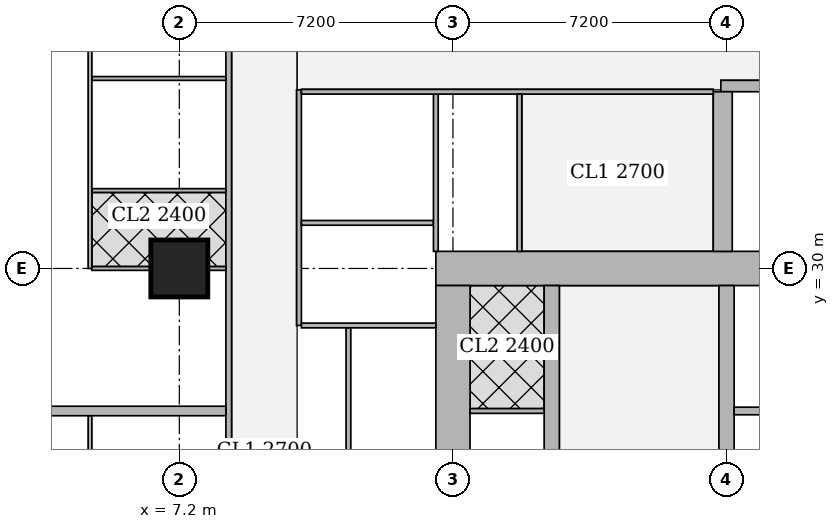
"""IFC4 building model, lengths in metres.
Left out: names, types, materials, properties, quantities, classifications, styles, units other than length and angle.
Written with IfcOpenShell. Run it as: python <this file> out.ifc"""

import sys

from ifc_helpers import new_model, si_unit, direction, frame, frame_2d, origin, origin_2d, place, context, subcontext, project, spatial, rectangle, extrude, element, fill, save


model = new_model("IFC4")
c1 = context("Model", 3, precision=1e-05, world=origin(), true_north=direction((0.0, 1.0)))
c2 = subcontext(c1, "Body", "Model", "MODEL_VIEW")
j1 = project(units=[si_unit("LENGTHUNIT", "METRE"), si_unit("PLANEANGLEUNIT", "RADIAN")], contexts=[c1])
p1 = place(None, origin())
s1 = spatial("IfcSite", under=j1, at=p1, CompositionType="ELEMENT")
p2 = place(p1, origin())
s2 = spatial("IfcBuilding", under=s1, at=p2, CompositionType="ELEMENT")
p3 = place(p2, frame((0.0, 0.0, 158.3)))
s3 = spatial("IfcBuildingStorey", under=s2, at=p3, CompositionType="ELEMENT", Elevation=158.3)
p4 = place(p3, frame((7.2, 30.0, 0.0), z_axis=(0.0, 0.0, 1.0), x_axis=(1.0, 0.0, 0.0)))
e1 = element("IfcColumn", 1, at=p4, inside=s3, PredefinedType="COLUMN", context=c2, shape_type="SweptSolid", body=[
    extrude(rectangle(XDim=1.5, YDim=1.5, at=origin_2d()), origin(), (0.0, 0.0, 1.0), 3.75),
])
p5 = place(p3, frame((13.95, 30.0, 0.0), z_axis=(0.0, 0.0, 1.0), x_axis=(1.0, 0.0, 0.0)))
e2 = element("IfcWall", 2, at=p5, inside=s3, PredefinedType="SHEAR", context=c2, shape_type="SweptSolid", body=[
    extrude(rectangle(XDim=15.3, YDim=0.9, at=frame_2d((7.65, 0.0))), origin(), (0.0, 0.0, 1.0), 3.75),
])
p6 = place(p5, frame((4.45, 0.0, 0.0)))
e3 = element("IfcOpeningElement", 3, at=p6, cuts=e2, PredefinedType="OPENING", context=c2, shape_type="SweptSolid", body=[
    extrude(rectangle(XDim=1.8, YDim=2.1, at=frame_2d((0.9, 1.05))), frame((0.0, 0.46, 0.0), z_axis=(0.0, -1.0, 0.0), x_axis=(1.0, 0.0, 0.0)), (0.0, 0.0, 1.0), 0.92),
])
p7 = place(p5, frame((10.7, 0.0, 0.0)))
e4 = element("IfcOpeningElement", 4, at=p7, cuts=e2, PredefinedType="OPENING", context=c2, shape_type="SweptSolid", body=[
    extrude(rectangle(XDim=1.1, YDim=2.1, at=frame_2d((0.55, 1.05))), frame((0.0, 0.46, 0.0), z_axis=(0.0, -1.0, 0.0), x_axis=(1.0, 0.0, 0.0)), (0.0, 0.0, 1.0), 0.92),
])
p8 = place(p3, frame((14.4, 15.45, 0.0), z_axis=(0.0, 0.0, 1.0), x_axis=(0.0, 1.0, 0.0)))
e5 = element("IfcWall", 5, at=p8, inside=s3, PredefinedType="SHEAR", context=c2, shape_type="SweptSolid", body=[
    extrude(rectangle(XDim=14.1, YDim=0.9, at=frame_2d((7.05, 0.0))), origin(), (0.0, 0.0, 1.0), 3.75),
])
p9 = place(p3, frame((17.0, 15.45, 0.0), z_axis=(0.0, 0.0, 1.0), x_axis=(0.0, 1.0, 0.0)))
e6 = element("IfcWall", 6, at=p9, inside=s3, PredefinedType="SHEAR", context=c2, shape_type="SweptSolid", body=[
    extrude(rectangle(XDim=14.1, YDim=0.4, at=frame_2d((7.05, 0.0))), origin(), (0.0, 0.0, 1.0), 3.75),
])
p10 = place(p9, frame((0.925, 0.0, 0.0)))
e7 = element("IfcOpeningElement", 7, at=p10, cuts=e6, PredefinedType="OPENING", context=c2, shape_type="SweptSolid", body=[
    extrude(rectangle(XDim=1.0, YDim=2.1, at=frame_2d((0.5, 1.05))), frame((0.0, 0.21, 0.0), z_axis=(0.0, -1.0, 0.0), x_axis=(1.0, 0.0, 0.0)), (0.0, 0.0, 1.0), 0.42),
])
p11 = place(p9, frame((4.675, 0.0, 0.0)))
e8 = element("IfcOpeningElement", 8, at=p11, cuts=e6, PredefinedType="OPENING", context=c2, shape_type="SweptSolid", body=[
    extrude(rectangle(XDim=1.0, YDim=2.1, at=frame_2d((0.5, 1.05))), frame((0.0, 0.21, 0.0), z_axis=(0.0, -1.0, 0.0), x_axis=(1.0, 0.0, 0.0)), (0.0, 0.0, 1.0), 0.42),
])
p12 = place(p9, frame((8.425, 0.0, 0.0)))
e9 = element("IfcOpeningElement", 9, at=p12, cuts=e6, PredefinedType="OPENING", context=c2, shape_type="SweptSolid", body=[
    extrude(rectangle(XDim=1.0, YDim=2.1, at=frame_2d((0.5, 1.05))), frame((0.0, 0.21, 0.0), z_axis=(0.0, -1.0, 0.0), x_axis=(1.0, 0.0, 0.0)), (0.0, 0.0, 1.0), 0.42),
])
p13 = place(p9, frame((12.175, 0.0, 0.0)))
e10 = element("IfcOpeningElement", 10, at=p13, cuts=e6, PredefinedType="OPENING", context=c2, shape_type="SweptSolid", body=[
    extrude(rectangle(XDim=1.0, YDim=2.1, at=frame_2d((0.5, 1.05))), frame((0.0, 0.21, 0.0), z_axis=(0.0, -1.0, 0.0), x_axis=(1.0, 0.0, 0.0)), (0.0, 0.0, 1.0), 0.42),
])
p14 = place(p3, frame((21.6, 15.45, 0.0), z_axis=(0.0, 0.0, 1.0), x_axis=(0.0, 1.0, 0.0)))
e11 = element("IfcWall", 11, at=p14, inside=s3, PredefinedType="SHEAR", context=c2, shape_type="SweptSolid", body=[
    extrude(rectangle(XDim=14.1, YDim=0.4, at=frame_2d((7.05, 0.0))), origin(), (0.0, 0.0, 1.0), 3.75),
])
p15 = place(p14, frame((0.875, 0.0, 0.0)))
e12 = element("IfcOpeningElement", 12, at=p15, cuts=e11, PredefinedType="OPENING", context=c2, shape_type="SweptSolid", body=[
    extrude(rectangle(XDim=1.1, YDim=2.1, at=frame_2d((0.55, 1.05))), frame((0.0, 0.21, 0.0), z_axis=(0.0, -1.0, 0.0), x_axis=(1.0, 0.0, 0.0)), (0.0, 0.0, 1.0), 0.42),
])
p16 = place(p14, frame((4.625, 0.0, 0.0)))
e13 = element("IfcOpeningElement", 13, at=p16, cuts=e11, PredefinedType="OPENING", context=c2, shape_type="SweptSolid", body=[
    extrude(rectangle(XDim=1.1, YDim=2.1, at=frame_2d((0.55, 1.05))), frame((0.0, 0.21, 0.0), z_axis=(0.0, -1.0, 0.0), x_axis=(1.0, 0.0, 0.0)), (0.0, 0.0, 1.0), 0.42),
])
p17 = place(p14, frame((8.375, 0.0, 0.0)))
e14 = element("IfcOpeningElement", 14, at=p17, cuts=e11, PredefinedType="OPENING", context=c2, shape_type="SweptSolid", body=[
    extrude(rectangle(XDim=1.1, YDim=2.1, at=frame_2d((0.55, 1.05))), frame((0.0, 0.21, 0.0), z_axis=(0.0, -1.0, 0.0), x_axis=(1.0, 0.0, 0.0)), (0.0, 0.0, 1.0), 0.42),
])
p18 = place(p14, frame((12.125, 0.0, 0.0)))
e15 = element("IfcOpeningElement", 15, at=p18, cuts=e11, PredefinedType="OPENING", context=c2, shape_type="SweptSolid", body=[
    extrude(rectangle(XDim=1.1, YDim=2.1, at=frame_2d((0.55, 1.05))), frame((0.0, 0.21, 0.0), z_axis=(0.0, -1.0, 0.0), x_axis=(1.0, 0.0, 0.0)), (0.0, 0.0, 1.0), 0.42),
])
p19 = place(p3, frame((21.45, 34.8, 0.0), z_axis=(0.0, 0.0, 1.0), x_axis=(1.0, 0.0, 0.0)))
e16 = element("IfcWall", 16, at=p19, inside=s3, PredefinedType="SHEAR", context=c2, shape_type="SweptSolid", body=[
    extrude(rectangle(XDim=7.5, YDim=0.3, at=frame_2d((3.75, 0.0))), origin(), (0.0, 0.0, 1.0), 3.75),
])
p20 = place(p19, frame((0.5, 0.0, 0.0)))
e17 = element("IfcOpeningElement", 17, at=p20, cuts=e16, PredefinedType="OPENING", context=c2, shape_type="SweptSolid", body=[
    extrude(rectangle(XDim=1.1, YDim=2.1, at=frame_2d((0.55, 1.05))), frame((0.0, 0.16, 0.0), z_axis=(0.0, -1.0, 0.0), x_axis=(1.0, 0.0, 0.0)), (0.0, 0.0, 1.0), 0.32),
])
p21 = place(p3, frame((21.5, 30.45, 0.0), z_axis=(0.0, 0.0, 1.0), x_axis=(0.0, 1.0, 0.0)))
e18 = element("IfcWall", 18, at=p21, inside=s3, PredefinedType="SHEAR", context=c2, shape_type="SweptSolid", body=[
    extrude(rectangle(XDim=4.2, YDim=0.5, at=frame_2d((2.1, 0.0))), origin(), (0.0, 0.0, 1.0), 3.75),
])
p22 = place(p3, frame((8.5, 1.964, 0.0), z_axis=(0.0, 0.0, 1.0), x_axis=(0.0, 1.0, 0.0)))
e19 = element("IfcWall", 19, at=p22, inside=s3, PredefinedType="SOLIDWALL", context=c2, shape_type="SweptSolid", body=[
    extrude(rectangle(XDim=41.097, YDim=0.15, at=frame_2d((20.548, 0.0))), origin(), (0.0, 0.0, 1.0), 3.5),
])
p23 = place(p22, frame((6.911, 0.0, 0.0)))
e20 = element("IfcOpeningElement", 20, at=p23, cuts=e19, PredefinedType="OPENING", context=c2, shape_type="SweptSolid", body=[
    extrude(rectangle(XDim=1.0, YDim=2.1, at=frame_2d((0.5, 1.05))), frame((0.0, 0.085, 0.0), z_axis=(0.0, -1.0, 0.0), x_axis=(1.0, 0.0, 0.0)), (0.0, 0.0, 1.0), 0.17),
])
p24 = place(p22, frame((10.661, 0.0, 0.0)))
e21 = element("IfcOpeningElement", 21, at=p24, cuts=e19, PredefinedType="OPENING", context=c2, shape_type="SweptSolid", body=[
    extrude(rectangle(XDim=1.0, YDim=2.1, at=frame_2d((0.5, 1.05))), frame((0.0, 0.085, 0.0), z_axis=(0.0, -1.0, 0.0), x_axis=(1.0, 0.0, 0.0)), (0.0, 0.0, 1.0), 0.17),
])
p25 = place(p22, frame((25.661, 0.0, 0.0)))
e22 = element("IfcOpeningElement", 22, at=p25, cuts=e19, PredefinedType="OPENING", context=c2, shape_type="SweptSolid", body=[
    extrude(rectangle(XDim=1.0, YDim=2.1, at=frame_2d((0.5, 1.05))), frame((0.0, 0.085, 0.0), z_axis=(0.0, -1.0, 0.0), x_axis=(1.0, 0.0, 0.0)), (0.0, 0.0, 1.0), 0.17),
])
p26 = place(p3, frame((4.85, 15.0, 0.0), z_axis=(0.0, 0.0, 1.0), x_axis=(0.0, 1.0, 0.0)))
e23 = element("IfcWall", 23, at=p26, inside=s3, PredefinedType="PARTITIONING", context=c2, shape_type="SweptSolid", body=[
    extrude(rectangle(XDim=11.125, YDim=0.1, at=frame_2d((5.562, 0.0))), origin(), (0.0, 0.0, 1.0), 3.5),
])
p27 = place(p26, frame((0.4, 0.0, 0.0)))
e24 = element("IfcOpeningElement", 24, at=p27, cuts=e23, PredefinedType="OPENING", context=c2, shape_type="SweptSolid", body=[
    extrude(rectangle(XDim=0.9, YDim=2.1, at=frame_2d((0.45, 1.05))), frame((0.0, 0.06, 0.0), z_axis=(0.0, -1.0, 0.0), x_axis=(1.0, 0.0, 0.0)), (0.0, 0.0, 1.0), 0.12),
])
p28 = place(p26, frame((5.799, 0.0, 0.0)))
e25 = element("IfcOpeningElement", 25, at=p28, cuts=e23, PredefinedType="OPENING", context=c2, shape_type="SweptSolid", body=[
    extrude(rectangle(XDim=0.9, YDim=2.1, at=frame_2d((0.45, 1.05))), frame((0.0, 0.06, 0.0), z_axis=(0.0, -1.0, 0.0), x_axis=(1.0, 0.0, 0.0)), (0.0, 0.0, 1.0), 0.12),
])
p29 = place(p26, frame((8.075, 0.0, 0.0)))
e26 = element("IfcOpeningElement", 26, at=p29, cuts=e23, PredefinedType="OPENING", context=c2, shape_type="SweptSolid", body=[
    extrude(rectangle(XDim=0.9, YDim=2.1, at=frame_2d((0.45, 1.05))), frame((0.0, 0.06, 0.0), z_axis=(0.0, -1.0, 0.0), x_axis=(1.0, 0.0, 0.0)), (0.0, 0.0, 1.0), 0.12),
])
p30 = place(p26, frame((2.899, 0.0, 0.0)))
e27 = element("IfcOpeningElement", 27, at=p30, cuts=e23, PredefinedType="OPENING", context=c2, shape_type="SweptSolid", body=[
    extrude(rectangle(XDim=0.9, YDim=2.1, at=frame_2d((0.45, 1.05))), frame((0.0, 0.06, 0.0), z_axis=(0.0, -1.0, 0.0), x_axis=(1.0, 0.0, 0.0)), (0.0, 0.0, 1.0), 0.12),
])
p31 = place(p26, frame((9.95, 0.0, 0.0)))
e28 = element("IfcOpeningElement", 28, at=p31, cuts=e23, PredefinedType="OPENING", context=c2, shape_type="SweptSolid", body=[
    extrude(rectangle(XDim=0.9, YDim=2.1, at=frame_2d((0.45, 1.05))), frame((0.0, 0.06, 0.0), z_axis=(0.0, -1.0, 0.0), x_axis=(1.0, 0.0, 0.0)), (0.0, 0.0, 1.0), 0.12),
])
p32 = place(p3, frame((4.85, 30.0, 0.0), z_axis=(0.0, 0.0, 1.0), x_axis=(0.0, 1.0, 0.0)))
e29 = element("IfcWall", 29, at=p32, inside=s3, PredefinedType="PARTITIONING", context=c2, shape_type="SweptSolid", body=[
    extrude(rectangle(XDim=12.507, YDim=0.1, at=frame_2d((6.253, 0.0))), origin(), (0.0, 0.0, 1.0), 3.5),
])
p33 = place(p32, frame((0.575, 0.0, 0.0)))
e30 = element("IfcOpeningElement", 30, at=p33, cuts=e29, PredefinedType="OPENING", context=c2, shape_type="SweptSolid", body=[
    extrude(rectangle(XDim=0.9, YDim=2.1, at=frame_2d((0.45, 1.05))), frame((0.0, 0.06, 0.0), z_axis=(0.0, -1.0, 0.0), x_axis=(1.0, 0.0, 0.0)), (0.0, 0.0, 1.0), 0.12),
])
p34 = place(p32, frame((5.799, 0.0, 0.0)))
e31 = element("IfcOpeningElement", 31, at=p34, cuts=e29, PredefinedType="OPENING", context=c2, shape_type="SweptSolid", body=[
    extrude(rectangle(XDim=0.9, YDim=2.1, at=frame_2d((0.45, 1.05))), frame((0.0, 0.06, 0.0), z_axis=(0.0, -1.0, 0.0), x_axis=(1.0, 0.0, 0.0)), (0.0, 0.0, 1.0), 0.12),
])
p35 = place(p32, frame((7.9, 0.0, 0.0)))
e32 = element("IfcOpeningElement", 32, at=p35, cuts=e29, PredefinedType="OPENING", context=c2, shape_type="SweptSolid", body=[
    extrude(rectangle(XDim=0.9, YDim=2.1, at=frame_2d((0.45, 1.05))), frame((0.0, 0.06, 0.0), z_axis=(0.0, -1.0, 0.0), x_axis=(1.0, 0.0, 0.0)), (0.0, 0.0, 1.0), 0.12),
])
p36 = place(p32, frame((3.075, 0.0, 0.0)))
e33 = element("IfcOpeningElement", 33, at=p36, cuts=e29, PredefinedType="OPENING", context=c2, shape_type="SweptSolid", body=[
    extrude(rectangle(XDim=0.9, YDim=2.1, at=frame_2d((0.45, 1.05))), frame((0.0, 0.06, 0.0), z_axis=(0.0, -1.0, 0.0), x_axis=(1.0, 0.0, 0.0)), (0.0, 0.0, 1.0), 0.12),
])
p37 = place(p32, frame((10.4, 0.0, 0.0)))
e34 = element("IfcOpeningElement", 34, at=p37, cuts=e29, PredefinedType="OPENING", context=c2, shape_type="SweptSolid", body=[
    extrude(rectangle(XDim=0.9, YDim=2.1, at=frame_2d((0.45, 1.05))), frame((0.0, 0.06, 0.0), z_axis=(0.0, -1.0, 0.0), x_axis=(1.0, 0.0, 0.0)), (0.0, 0.0, 1.0), 0.12),
])
p38 = place(p3, frame((4.9, 30.0, 0.0), z_axis=(0.0, 0.0, 1.0), x_axis=(1.0, 0.0, 0.0)))
e35 = element("IfcWall", 35, at=p38, inside=s3, PredefinedType="PARTITIONING", context=c2, shape_type="SweptSolid", body=[
    extrude(rectangle(XDim=1.549, YDim=0.1, at=frame_2d((0.774, 0.0))), origin(), (0.0, 0.0, 1.0), 3.5),
])
p39 = place(p3, frame((7.951, 30.0, 0.0), z_axis=(0.0, 0.0, 1.0), x_axis=(1.0, 0.0, 0.0)))
e36 = element("IfcWall", 36, at=p39, inside=s3, PredefinedType="PARTITIONING", context=c2, shape_type="SweptSolid", body=[
    extrude(rectangle(XDim=0.474, YDim=0.1, at=frame_2d((0.237, 0.0))), origin(), (0.0, 0.0, 1.0), 3.5),
])
for number, where, z_axis, x_axis in (
    (37, (4.9, 34.999, 0.0), (0.0, 0.0, 1.0), (1.0, 0.0, 0.0)),
    (38, (4.9, 32.05, 0.0), (0.0, 0.0, 1.0), (1.0, 0.0, 0.0)),
):
    element("IfcWall", number, at=place(p3, frame(where, z_axis=z_axis, x_axis=x_axis)), inside=s3, PredefinedType="PARTITIONING", context=c2, shape_type="SweptSolid", body=[
        extrude(rectangle(XDim=3.525, YDim=0.1, at=frame_2d((1.763, 0.0))), origin(), (0.0, 0.0, 1.0), 3.5),
    ])
p40 = place(p3, frame((3.65, 26.25, 0.0), z_axis=(0.0, 0.0, 1.0), x_axis=(1.0, 0.0, 0.0)))
e39 = element("IfcWall", 39, at=p40, inside=s3, PredefinedType="SOLIDWALL", context=c2, shape_type="SweptSolid", body=[
    extrude(rectangle(XDim=4.775, YDim=0.25, at=frame_2d((2.388, 0.0))), origin(), (0.0, 0.0, 1.0), 3.5),
])
p41 = place(p3, frame((10.35, 28.5, 0.0), z_axis=(0.0, 0.0, 1.0), x_axis=(0.0, 1.0, 0.0)))
e40 = element("IfcWall", 40, at=p41, inside=s3, PredefinedType="PARTITIONING", context=c2, shape_type="SweptSolid", body=[
    extrude(rectangle(XDim=6.2, YDim=0.125, at=frame_2d((3.1, 0.0))), origin(), (0.0, 0.0, 1.0), 3.5),
])
p42 = place(p41, frame((0.85, 0.0, 0.0)))
e41 = element("IfcOpeningElement", 41, at=p42, cuts=e40, PredefinedType="OPENING", context=c2, shape_type="SweptSolid", body=[
    extrude(rectangle(XDim=1.0, YDim=2.1, at=frame_2d((0.5, 1.05))), frame((0.0, 0.073, 0.0), z_axis=(0.0, -1.0, 0.0), x_axis=(1.0, 0.0, 0.0)), (0.0, 0.0, 1.0), 0.145),
])
p43 = place(p41, frame((3.95, 0.0, 0.0)))
e42 = element("IfcOpeningElement", 42, at=p43, cuts=e40, PredefinedType="OPENING", context=c2, shape_type="SweptSolid", body=[
    extrude(rectangle(XDim=1.0, YDim=2.1, at=frame_2d((0.5, 1.05))), frame((0.0, 0.073, 0.0), z_axis=(0.0, -1.0, 0.0), x_axis=(1.0, 0.0, 0.0)), (0.0, 0.0, 1.0), 0.145),
])
p44 = place(p3, frame((11.65, 19.562, 0.0), z_axis=(0.0, 0.0, 1.0), x_axis=(0.0, 1.0, 0.0)))
e43 = element("IfcWall", 43, at=p44, inside=s3, PredefinedType="PARTITIONING", context=c2, shape_type="SweptSolid", body=[
    extrude(rectangle(XDim=8.876, YDim=0.125, at=frame_2d((4.438, 0.0))), origin(), (0.0, 0.0, 1.0), 3.5),
])
p45 = place(p44, frame((3.938, 0.0, 0.0)))
e44 = element("IfcOpeningElement", 44, at=p45, cuts=e43, PredefinedType="OPENING", context=c2, shape_type="SweptSolid", body=[
    extrude(rectangle(XDim=1.0, YDim=2.1, at=frame_2d((0.5, 1.05))), frame((0.0, 0.073, 0.0), z_axis=(0.0, -1.0, 0.0), x_axis=(1.0, 0.0, 0.0)), (0.0, 0.0, 1.0), 0.145),
])
p46 = place(p3, frame((10.413, 28.5, 0.0), z_axis=(0.0, 0.0, 1.0), x_axis=(1.0, 0.0, 0.0)))
e45 = element("IfcWall", 45, at=p46, inside=s3, PredefinedType="PARTITIONING", context=c2, shape_type="SweptSolid", body=[
    extrude(rectangle(XDim=3.537, YDim=0.125, at=frame_2d((1.769, 0.0))), origin(), (0.0, 0.0, 1.0), 3.5),
])
p47 = place(p3, frame((10.413, 31.2, 0.0), z_axis=(0.0, 0.0, 1.0), x_axis=(1.0, 0.0, 0.0)))
e46 = element("IfcWall", 46, at=p47, inside=s3, PredefinedType="PARTITIONING", context=c2, shape_type="SweptSolid", body=[
    extrude(rectangle(XDim=3.475, YDim=0.125, at=frame_2d((1.737, 0.0))), origin(), (0.0, 0.0, 1.0), 3.5),
])
p48 = place(p3, frame((13.95, 30.45, 0.0), z_axis=(0.0, 0.0, 1.0), x_axis=(0.0, 1.0, 0.0)))
e47 = element("IfcWall", 47, at=p48, inside=s3, PredefinedType="PARTITIONING", context=c2, shape_type="SweptSolid", body=[
    extrude(rectangle(XDim=4.137, YDim=0.125, at=frame_2d((2.068, 0.0))), origin(), (0.0, 0.0, 1.0), 3.5),
])
p49 = place(p3, frame((10.413, 34.65, 0.0), z_axis=(0.0, 0.0, 1.0), x_axis=(1.0, 0.0, 0.0)))
e48 = element("IfcWall", 48, at=p49, inside=s3, PredefinedType="PARTITIONING", context=c2, shape_type="SweptSolid", body=[
    extrude(rectangle(XDim=10.837, YDim=0.125, at=frame_2d((5.418, 0.0))), origin(), (0.0, 0.0, 1.0), 3.5),
])
p50 = place(p49, frame((7.487, 0.0, 0.0)))
e49 = element("IfcOpeningElement", 49, at=p50, cuts=e48, PredefinedType="OPENING", context=c2, shape_type="SweptSolid", body=[
    extrude(rectangle(XDim=1.8, YDim=2.1, at=frame_2d((0.9, 1.05))), frame((0.0, 0.073, 0.0), z_axis=(0.0, -1.0, 0.0), x_axis=(1.0, 0.0, 0.0)), (0.0, 0.0, 1.0), 0.145),
])
p51 = place(p3, frame((16.15, 30.45, 0.0), z_axis=(0.0, 0.0, 1.0), x_axis=(0.0, 1.0, 0.0)))
e50 = element("IfcWall", 50, at=p51, inside=s3, PredefinedType="PARTITIONING", context=c2, shape_type="SweptSolid", body=[
    extrude(rectangle(XDim=4.137, YDim=0.125, at=frame_2d((2.068, 0.0))), origin(), (0.0, 0.0, 1.0), 3.5),
])
p52 = place(p51, frame((1.625, 0.0, 0.0)))
e51 = element("IfcOpeningElement", 51, at=p52, cuts=e50, PredefinedType="OPENING", context=c2, shape_type="SweptSolid", body=[
    extrude(rectangle(XDim=1.0, YDim=2.1, at=frame_2d((0.5, 1.05))), frame((0.0, 0.073, 0.0), z_axis=(0.0, -1.0, 0.0), x_axis=(1.0, 0.0, 0.0)), (0.0, 0.0, 1.0), 0.145),
])
p53 = place(p3, frame((14.85, 26.25, 0.0), z_axis=(0.0, 0.0, 1.0), x_axis=(1.0, 0.0, 0.0)))
e52 = element("IfcWall", 52, at=p53, inside=s3, PredefinedType="PARTITIONING", context=c2, shape_type="SweptSolid", body=[
    extrude(rectangle(XDim=1.95, YDim=0.125, at=frame_2d((0.975, 0.0))), origin(), (0.0, 0.0, 1.0), 3.5),
])
p54 = place(p3, frame((21.8, 26.25, 0.0), z_axis=(0.0, 0.0, 1.0), x_axis=(1.0, 0.0, 0.0)))
e53 = element("IfcWall", 53, at=p54, inside=s3, PredefinedType="SOLIDWALL", context=c2, shape_type="SweptSolid", body=[
    extrude(rectangle(XDim=2.2, YDim=0.2, at=frame_2d((1.1, 0.0))), origin(), (0.0, 0.0, 1.0), 3.5),
])
p55 = place(p31, origin())
e54 = element("IfcDoor", 54, at=p55, inside=s3, OperationType="SINGLE_SWING_LEFT", PredefinedType="DOOR", context=c2, shape_type="SweptSolid", body=[
    extrude(rectangle(XDim=0.9, YDim=2.1, at=frame_2d((0.45, 1.05))), frame((0.0, 0.025, 0.0), z_axis=(0.0, -1.0, 0.0), x_axis=(1.0, 0.0, 0.0)), (0.0, 0.0, 1.0), 0.05),
])
fill(e28, e54)
p56 = place(p33, origin())
e55 = element("IfcDoor", 55, at=p56, inside=s3, OperationType="SINGLE_SWING_RIGHT", PredefinedType="DOOR", context=c2, shape_type="SweptSolid", body=[
    extrude(rectangle(XDim=0.9, YDim=2.1, at=frame_2d((0.45, 1.05))), frame((0.0, 0.025, 0.0), z_axis=(0.0, -1.0, 0.0), x_axis=(1.0, 0.0, 0.0)), (0.0, 0.0, 1.0), 0.05),
])
fill(e30, e55)
p57 = place(p36, origin())
e56 = element("IfcDoor", 56, at=p57, inside=s3, OperationType="SINGLE_SWING_LEFT", PredefinedType="DOOR", context=c2, shape_type="SweptSolid", body=[
    extrude(rectangle(XDim=0.9, YDim=2.1, at=frame_2d((0.45, 1.05))), frame((0.0, 0.025, 0.0), z_axis=(0.0, -1.0, 0.0), x_axis=(1.0, 0.0, 0.0)), (0.0, 0.0, 1.0), 0.05),
])
fill(e33, e56)
p58 = place(p25, origin())
e57 = element("IfcDoor", 57, at=p58, inside=s3, OperationType="SINGLE_SWING_RIGHT", PredefinedType="DOOR", context=c2, shape_type="SweptSolid", body=[
    extrude(rectangle(XDim=1.0, YDim=2.1, at=frame_2d((0.5, 1.05))), frame((0.0, 0.025, 0.0), z_axis=(0.0, -1.0, 0.0), x_axis=(1.0, 0.0, 0.0)), (0.0, 0.0, 1.0), 0.05),
])
fill(e22, e57)
p59 = place(p42, origin())
e58 = element("IfcDoor", 58, at=p59, inside=s3, OperationType="SINGLE_SWING_RIGHT", PredefinedType="DOOR", context=c2, shape_type="SweptSolid", body=[
    extrude(rectangle(XDim=1.0, YDim=2.1, at=frame_2d((0.5, 1.05))), frame((0.0, 0.025, 0.0), z_axis=(0.0, -1.0, 0.0), x_axis=(1.0, 0.0, 0.0)), (0.0, 0.0, 1.0), 0.05),
])
fill(e41, e58)
p60 = place(p43, origin())
e59 = element("IfcDoor", 59, at=p60, inside=s3, OperationType="SINGLE_SWING_LEFT", PredefinedType="DOOR", context=c2, shape_type="SweptSolid", body=[
    extrude(rectangle(XDim=1.0, YDim=2.1, at=frame_2d((0.5, 1.05))), frame((0.0, 0.025, 0.0), z_axis=(0.0, -1.0, 0.0), x_axis=(1.0, 0.0, 0.0)), (0.0, 0.0, 1.0), 0.05),
])
fill(e42, e59)
p61 = place(p52, origin())
e60 = element("IfcDoor", 60, at=p61, inside=s3, OperationType="SINGLE_SWING_RIGHT", PredefinedType="DOOR", context=c2, shape_type="SweptSolid", body=[
    extrude(rectangle(XDim=1.0, YDim=2.1, at=frame_2d((0.5, 1.05))), frame((0.0, 0.025, 0.0), z_axis=(0.0, -1.0, 0.0), x_axis=(1.0, 0.0, 0.0)), (0.0, 0.0, 1.0), 0.05),
])
fill(e51, e60)
p62 = place(p50, origin())
e61 = element("IfcDoor", 61, at=p62, inside=s3, OperationType="DOUBLE_DOOR_SINGLE_SWING", PredefinedType="DOOR", context=c2, shape_type="SweptSolid", body=[
    extrude(rectangle(XDim=1.8, YDim=2.1, at=frame_2d((0.9, 1.05))), frame((0.0, 0.025, 0.0), z_axis=(0.0, -1.0, 0.0), x_axis=(1.0, 0.0, 0.0)), (0.0, 0.0, 1.0), 0.05),
])
fill(e49, e61)
p63 = place(p13, origin())
e62 = element("IfcDoor", 62, at=p63, inside=s3, OperationType="SINGLE_SWING_RIGHT", PredefinedType="DOOR", context=c2, shape_type="SweptSolid", body=[
    extrude(rectangle(XDim=1.0, YDim=2.1, at=frame_2d((0.5, 1.05))), frame((0.0, 0.025, 0.0), z_axis=(0.0, -1.0, 0.0), x_axis=(1.0, 0.0, 0.0)), (0.0, 0.0, 1.0), 0.05),
])
fill(e10, e62)
p64 = place(p6, origin())
e63 = element("IfcDoor", 63, at=p64, inside=s3, OperationType="DOUBLE_DOOR_SINGLE_SWING", PredefinedType="DOOR", context=c2, shape_type="SweptSolid", body=[
    extrude(rectangle(XDim=1.8, YDim=2.1, at=frame_2d((0.9, 1.05))), frame((0.0, 0.025, 0.0), z_axis=(0.0, -1.0, 0.0), x_axis=(1.0, 0.0, 0.0)), (0.0, 0.0, 1.0), 0.05),
])
fill(e3, e63)
p65 = place(p18, origin())
e64 = element("IfcDoor", 64, at=p65, inside=s3, OperationType="DOUBLE_DOOR_SLIDING", PredefinedType="DOOR", context=c2, shape_type="SweptSolid", body=[
    extrude(rectangle(XDim=1.1, YDim=2.1, at=frame_2d((0.55, 1.05))), frame((0.0, 0.025, 0.0), z_axis=(0.0, -1.0, 0.0), x_axis=(1.0, 0.0, 0.0)), (0.0, 0.0, 1.0), 0.05),
])
fill(e15, e64)
p66 = place(p20, origin())
e65 = element("IfcDoor", 65, at=p66, inside=s3, OperationType="SINGLE_SWING_RIGHT", PredefinedType="DOOR", context=c2, shape_type="SweptSolid", body=[
    extrude(rectangle(XDim=1.1, YDim=2.1, at=frame_2d((0.55, 1.05))), frame((0.0, 0.025, 0.0), z_axis=(0.0, -1.0, 0.0), x_axis=(1.0, 0.0, 0.0)), (0.0, 0.0, 1.0), 0.05),
])
fill(e17, e65)
save(model, sys.argv[1])
